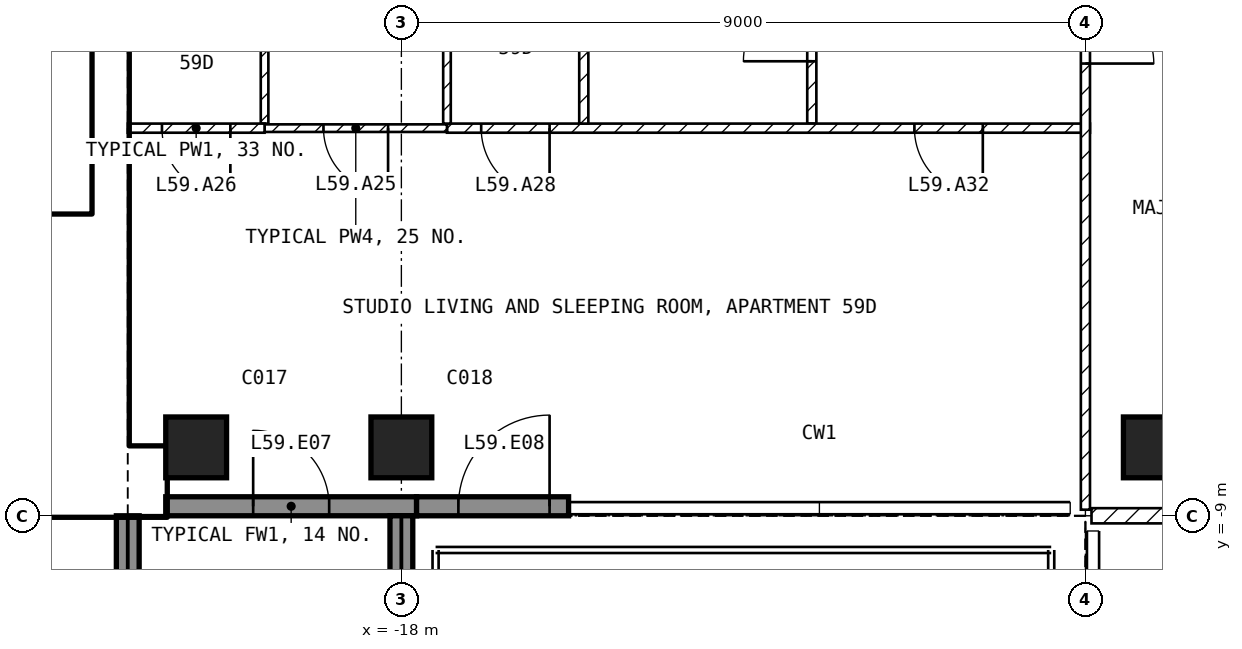
"""IFC4 building model, lengths in metres.
Left out: names, types, materials, properties, quantities, classifications, styles, units other than length and angle.
Written with IfcOpenShell. Run it as: python <this file> out.ifc"""

import sys

from ifc_helpers import new_model, si_unit, direction, frame, frame_2d, origin, origin_2d, place, context, subcontext, project, spatial, rectangle, extrude, element, fill, save


model = new_model("IFC4")
c1 = context("Model", 3, precision=1e-05, world=origin(), true_north=direction((0.0, 1.0)))
c2 = subcontext(c1, "Body", "Model", "MODEL_VIEW")
j1 = project(units=[si_unit("LENGTHUNIT", "METRE"), si_unit("PLANEANGLEUNIT", "RADIAN")], contexts=[c1])
p1 = place(None, origin())
s1 = spatial("IfcSite", under=j1, at=p1, CompositionType="ELEMENT")
p2 = place(p1, origin())
s2 = spatial("IfcBuilding", under=s1, at=p2, CompositionType="ELEMENT")
p3 = place(p2, frame((0.0, 0.0, 236.0)))
s3 = spatial("IfcBuildingStorey", under=s2, at=p3, CompositionType="ELEMENT", Elevation=236.0)
for number, where, z_axis, x_axis in (
    (1, (-20.7, -8.1, -0.25), (0.0, 0.0, 1.0), (1.0, 0.0, 0.0)),
    (2, (-18.0, -8.1, -0.25), (0.0, 0.0, 1.0), (1.0, 0.0, 0.0)),
    (3, (-8.1, -8.1, -0.25), (0.0, 0.0, 1.0), (1.0, 0.0, 0.0)),
):
    element("IfcColumn", number, at=place(p3, frame(where, z_axis=z_axis, x_axis=x_axis)), inside=s3, PredefinedType="COLUMN", context=c2, shape_type="SweptSolid", body=[
        extrude(rectangle(XDim=0.8, YDim=0.8, at=origin_2d()), origin(), (0.0, 0.0, 1.0), 3.5),
    ])
p4 = place(p3, frame((-21.1, -8.875, 0.0), z_axis=(0.0, 0.0, 1.0), x_axis=(1.0, 0.0, 0.0)))
e4 = element("IfcWall", 4, at=p4, inside=s3, PredefinedType="SOLIDWALL", context=c2, shape_type="SweptSolid", body=[
    extrude(rectangle(XDim=3.3, YDim=0.25, at=frame_2d((1.65, 0.0))), origin(), (0.0, 0.0, 1.0), 3.25),
])
p5 = place(p4, frame((1.15, 0.0, 0.0)))
e5 = element("IfcOpeningElement", 5, at=p5, cuts=e4, PredefinedType="OPENING", context=c2, shape_type="SweptSolid", body=[
    extrude(rectangle(XDim=1.0, YDim=2.4, at=frame_2d((0.5, 1.2))), frame((0.0, 0.135, 0.0), z_axis=(0.0, -1.0, 0.0), x_axis=(1.0, 0.0, 0.0)), (0.0, 0.0, 1.0), 0.27),
])
p6 = place(p3, frame((-17.8, -8.875, 0.0), z_axis=(0.0, 0.0, 1.0), x_axis=(1.0, 0.0, 0.0)))
e6 = element("IfcWall", 6, at=p6, inside=s3, PredefinedType="SOLIDWALL", context=c2, shape_type="SweptSolid", body=[
    extrude(rectangle(XDim=2.0, YDim=0.25, at=frame_2d((1.0, 0.0))), origin(), (0.0, 0.0, 1.0), 3.25),
])
p7 = place(p6, frame((0.55, 0.0, 0.0)))
e7 = element("IfcOpeningElement", 7, at=p7, cuts=e6, PredefinedType="OPENING", context=c2, shape_type="SweptSolid", body=[
    extrude(rectangle(XDim=1.2, YDim=2.4, at=frame_2d((0.6, 1.2))), frame((0.0, 0.135, 0.0), z_axis=(0.0, -1.0, 0.0), x_axis=(1.0, 0.0, 0.0)), (0.0, 0.0, 1.0), 0.27),
])
p8 = place(p3, frame((-21.6, -9.0, 0.0), z_axis=(0.0, 0.0, 1.0), x_axis=(0.0, -1.0, 0.0)))
e8 = element("IfcWall", 8, at=p8, inside=s3, PredefinedType="SOLIDWALL", context=c2, shape_type="SweptSolid", body=[
    extrude(rectangle(XDim=2.7, YDim=0.3, at=frame_2d((1.35, 0.0))), origin(), (0.0, 0.0, 1.0), 3.25),
])
p9 = place(p3, frame((-18.0, -9.0, 0.0), z_axis=(0.0, 0.0, 1.0), x_axis=(0.0, -1.0, 0.0)))
e9 = element("IfcWall", 9, at=p9, inside=s3, PredefinedType="SOLIDWALL", context=c2, shape_type="SweptSolid", body=[
    extrude(rectangle(XDim=2.74, YDim=0.3, at=frame_2d((1.37, 0.0))), origin(), (0.0, 0.0, 1.0), 3.25),
])
p10 = place(p3, frame((-30.2, -8.55, 0.0), z_axis=(0.0, 0.0, 1.0), x_axis=(1.0, 0.0, 0.0)))
e10 = element("IfcWall", 10, at=p10, inside=s3, PredefinedType="SHEAR", context=c2, shape_type="SweptSolid", body=[
    extrude(rectangle(XDim=9.1, YDim=0.9, at=frame_2d((4.55, 0.0))), origin(), (0.0, 0.0, 1.0), 3.25),
])
p11 = place(p3, frame((-21.825, -8.1, 0.0), z_axis=(0.0, 0.0, 1.0), x_axis=(0.0, 1.0, 0.0)))
e11 = element("IfcWall", 11, at=p11, inside=s3, PredefinedType="SHEAR", context=c2, shape_type="SweptSolid", body=[
    extrude(rectangle(XDim=6.9, YDim=0.45, at=frame_2d((3.45, 0.0))), origin(), (0.0, 0.0, 1.0), 3.25),
])
p12 = place(p3, frame((-28.35, -5.15, 0.0), z_axis=(0.0, 0.0, 1.0), x_axis=(1.0, 0.0, 0.0)))
e12 = element("IfcWall", 12, at=p12, inside=s3, PredefinedType="SOLIDWALL", context=c2, shape_type="SweptSolid", body=[
    extrude(rectangle(XDim=6.3, YDim=0.2, at=frame_2d((3.15, 0.0))), origin(), (0.0, 0.0, 1.0), 3.25),
])
p13 = place(p12, frame((5.1, 0.0, 0.0)))
e13 = element("IfcOpeningElement", 13, at=p13, cuts=e12, PredefinedType="OPENING", context=c2, shape_type="SweptSolid", body=[
    extrude(rectangle(XDim=1.0, YDim=2.1, at=frame_2d((0.5, 1.05))), frame((0.0, 0.11, 0.0), z_axis=(0.0, -1.0, 0.0), x_axis=(1.0, 0.0, 0.0)), (0.0, 0.0, 1.0), 0.22),
])
p14 = place(p3, frame((8.92, -9.0, 0.0), z_axis=(0.0, 0.0, 1.0), x_axis=(-1.0, 0.0, 0.0)))
e14 = element("IfcWall", 14, at=p14, inside=s3, PredefinedType="PARTITIONING", context=c2, shape_type="SweptSolid", body=[
    extrude(rectangle(XDim=17.84, YDim=0.2, at=frame_2d((8.92, 0.0))), origin(), (0.0, 0.0, 1.0), 3.25),
])
p15 = place(p14, frame((8.42, 0.0, 0.0)))
e15 = element("IfcOpeningElement", 15, at=p15, cuts=e14, PredefinedType="OPENING", context=c2, shape_type="SweptSolid", body=[
    extrude(rectangle(XDim=1.0, YDim=2.1, at=frame_2d((0.5, 1.05))), frame((0.0, 0.11, 0.0), z_axis=(0.0, -1.0, 0.0), x_axis=(1.0, 0.0, 0.0)), (0.0, 0.0, 1.0), 0.22),
])
p16 = place(p3, frame((-12.6, -3.84, 0.0), z_axis=(0.0, 0.0, 1.0), x_axis=(0.0, 1.0, 0.0)))
e16 = element("IfcWall", 16, at=p16, inside=s3, PredefinedType="PARTITIONING", context=c2, shape_type="SweptSolid", body=[
    extrude(rectangle(XDim=2.54, YDim=0.12, at=frame_2d((1.27, 0.0))), origin(), (0.0, 0.0, 1.0), 3.25),
])
p17 = place(p16, frame((0.82, 0.0, 0.0)))
e17 = element("IfcOpeningElement", 17, at=p17, cuts=e16, PredefinedType="OPENING", context=c2, shape_type="SweptSolid", body=[
    extrude(rectangle(XDim=0.9, YDim=2.1, at=frame_2d((0.45, 1.05))), frame((0.0, 0.07, 0.0), z_axis=(0.0, -1.0, 0.0), x_axis=(1.0, 0.0, 0.0)), (0.0, 0.0, 1.0), 0.14),
])
p18 = place(p3, frame((-8.94, -3.9, 0.0), z_axis=(0.0, 0.0, 1.0), x_axis=(-1.0, 0.0, 0.0)))
e18 = element("IfcWall", 18, at=p18, inside=s3, PredefinedType="PARTITIONING", context=c2, shape_type="SweptSolid", body=[
    extrude(rectangle(XDim=8.46, YDim=0.12, at=frame_2d((4.23, 0.0))), origin(), (0.0, 0.0, 1.0), 3.25),
])
p19 = place(p18, frame((7.11, 0.0, 0.0)))
e19 = element("IfcOpeningElement", 19, at=p19, cuts=e18, PredefinedType="OPENING", context=c2, shape_type="SweptSolid", body=[
    extrude(rectangle(XDim=0.9, YDim=2.1, at=frame_2d((0.45, 1.05))), frame((0.0, 0.07, 0.0), z_axis=(0.0, -1.0, 0.0), x_axis=(1.0, 0.0, 0.0)), (0.0, 0.0, 1.0), 0.14),
])
p20 = place(p18, frame((1.41, 0.0, 0.0)))
e20 = element("IfcOpeningElement", 20, at=p20, cuts=e18, PredefinedType="OPENING", context=c2, shape_type="SweptSolid", body=[
    extrude(rectangle(XDim=0.9, YDim=2.1, at=frame_2d((0.45, 1.05))), frame((0.0, 0.07, 0.0), z_axis=(0.0, -1.0, 0.0), x_axis=(1.0, 0.0, 0.0)), (0.0, 0.0, 1.0), 0.14),
])
p21 = place(p3, frame((-9.0, -1.3, 0.0), z_axis=(0.0, 0.0, 1.0), x_axis=(0.0, -1.0, 0.0)))
e21 = element("IfcWall", 21, at=p21, inside=s3, PredefinedType="PARTITIONING", context=c2, shape_type="SweptSolid", body=[
    extrude(rectangle(XDim=7.62, YDim=0.12, at=frame_2d((3.81, 0.0))), origin(), (0.0, 0.0, 1.0), 3.25),
])
p22 = place(p21, frame((0.85, 0.0, 0.0)))
e22 = element("IfcOpeningElement", 22, at=p22, cuts=e21, PredefinedType="OPENING", context=c2, shape_type="SweptSolid", body=[
    extrude(rectangle(XDim=0.9, YDim=2.1, at=frame_2d((0.45, 1.05))), frame((0.0, 0.07, 0.0), z_axis=(0.0, -1.0, 0.0), x_axis=(1.0, 0.0, 0.0)), (0.0, 0.0, 1.0), 0.14),
])
p23 = place(p3, frame((-15.6, -3.84, 0.0), z_axis=(0.0, 0.0, 1.0), x_axis=(0.0, 1.0, 0.0)))
e23 = element("IfcWall", 23, at=p23, inside=s3, PredefinedType="PARTITIONING", context=c2, shape_type="SweptSolid", body=[
    extrude(rectangle(XDim=2.54, YDim=0.12, at=frame_2d((1.27, 0.0))), origin(), (0.0, 0.0, 1.0), 3.25),
])
for number, where, z_axis, x_axis in (
    (24, (-17.4, -3.84, 0.0), (0.0, 0.0, 1.0), (0.0, 1.0, 0.0)),
    (25, (-19.8, -3.84, 0.0), (0.0, 0.0, 1.0), (0.0, 1.0, 0.0)),
):
    element("IfcWall", number, at=place(p3, frame(where, z_axis=z_axis, x_axis=x_axis)), inside=s3, PredefinedType="PARTITIONING", context=c2, shape_type="SweptSolid", body=[
        extrude(rectangle(XDim=2.54, YDim=0.1, at=frame_2d((1.27, 0.0))), origin(), (0.0, 0.0, 1.0), 3.25),
    ])
p24 = place(p3, frame((-17.4, -3.9, 0.0), z_axis=(0.0, 0.0, 1.0), x_axis=(-1.0, 0.0, 0.0)))
e26 = element("IfcWall", 26, at=p24, inside=s3, PredefinedType="PARTITIONING", context=c2, shape_type="SweptSolid", body=[
    extrude(rectangle(XDim=2.4, YDim=0.1, at=frame_2d((1.2, 0.0))), origin(), (0.0, 0.0, 1.0), 3.25),
])
p25 = place(p24, frame((0.775, 0.0, 0.0)))
e27 = element("IfcOpeningElement", 27, at=p25, cuts=e26, PredefinedType="OPENING", context=c2, shape_type="SweptSolid", body=[
    extrude(rectangle(XDim=0.85, YDim=2.1, at=frame_2d((0.425, 1.05))), frame((0.0, 0.06, 0.0), z_axis=(0.0, -1.0, 0.0), x_axis=(1.0, 0.0, 0.0)), (0.0, 0.0, 1.0), 0.12),
])
p26 = place(p3, frame((-19.8, -3.9, 0.0), z_axis=(0.0, 0.0, 1.0), x_axis=(-1.0, 0.0, 0.0)))
e28 = element("IfcWall", 28, at=p26, inside=s3, PredefinedType="PARTITIONING", context=c2, shape_type="SweptSolid", body=[
    extrude(rectangle(XDim=1.8, YDim=0.12, at=frame_2d((0.9, 0.0))), origin(), (0.0, 0.0, 1.0), 3.25),
])
p27 = place(p26, frame((0.45, 0.0, 0.0)))
e29 = element("IfcOpeningElement", 29, at=p27, cuts=e28, PredefinedType="OPENING", context=c2, shape_type="SweptSolid", body=[
    extrude(rectangle(XDim=0.9, YDim=2.1, at=frame_2d((0.45, 1.05))), frame((0.0, 0.07, 0.0), z_axis=(0.0, -1.0, 0.0), x_axis=(1.0, 0.0, 0.0)), (0.0, 0.0, 1.0), 0.14),
])
p28 = place(p5, origin())
e30 = element("IfcDoor", 30, at=p28, inside=s3, OperationType="SINGLE_SWING_LEFT", PredefinedType="DOOR", context=c2, shape_type="SweptSolid", body=[
    extrude(rectangle(XDim=1.0, YDim=2.4, at=frame_2d((0.5, 1.2))), frame((0.0, 0.025, 0.0), z_axis=(0.0, -1.0, 0.0), x_axis=(1.0, 0.0, 0.0)), (0.0, 0.0, 1.0), 0.05),
])
fill(e5, e30)
p29 = place(p7, origin())
e31 = element("IfcDoor", 31, at=p29, inside=s3, OperationType="SINGLE_SWING_RIGHT", PredefinedType="DOOR", context=c2, shape_type="SweptSolid", body=[
    extrude(rectangle(XDim=1.2, YDim=2.4, at=frame_2d((0.6, 1.2))), frame((0.0, 0.025, 0.0), z_axis=(0.0, -1.0, 0.0), x_axis=(1.0, 0.0, 0.0)), (0.0, 0.0, 1.0), 0.05),
])
fill(e7, e31)
p30 = place(p13, origin())
e32 = element("IfcDoor", 32, at=p30, inside=s3, OperationType="SINGLE_SWING_LEFT", PredefinedType="DOOR", context=c2, shape_type="SweptSolid", body=[
    extrude(rectangle(XDim=1.0, YDim=2.1, at=frame_2d((0.5, 1.05))), frame((0.0, 0.025, 0.0), z_axis=(0.0, -1.0, 0.0), x_axis=(1.0, 0.0, 0.0)), (0.0, 0.0, 1.0), 0.05),
])
fill(e13, e32)
p31 = place(p25, origin())
e33 = element("IfcDoor", 33, at=p31, inside=s3, OperationType="SINGLE_SWING_LEFT", PredefinedType="DOOR", context=c2, shape_type="SweptSolid", body=[
    extrude(rectangle(XDim=0.85, YDim=2.1, at=frame_2d((0.425, 1.05))), frame((0.0, 0.025, 0.0), z_axis=(0.0, -1.0, 0.0), x_axis=(1.0, 0.0, 0.0)), (0.0, 0.0, 1.0), 0.05),
])
fill(e27, e33)
p32 = place(p27, origin())
e34 = element("IfcDoor", 34, at=p32, inside=s3, OperationType="SINGLE_SWING_LEFT", PredefinedType="DOOR", context=c2, shape_type="SweptSolid", body=[
    extrude(rectangle(XDim=0.9, YDim=2.1, at=frame_2d((0.45, 1.05))), frame((0.0, 0.025, 0.0), z_axis=(0.0, -1.0, 0.0), x_axis=(1.0, 0.0, 0.0)), (0.0, 0.0, 1.0), 0.05),
])
fill(e29, e34)
p33 = place(p17, origin())
e35 = element("IfcDoor", 35, at=p33, inside=s3, OperationType="SINGLE_SWING_LEFT", PredefinedType="DOOR", context=c2, shape_type="SweptSolid", body=[
    extrude(rectangle(XDim=0.9, YDim=2.1, at=frame_2d((0.45, 1.05))), frame((0.0, 0.025, 0.0), z_axis=(0.0, -1.0, 0.0), x_axis=(1.0, 0.0, 0.0)), (0.0, 0.0, 1.0), 0.05),
])
fill(e17, e35)
p34 = place(p19, origin())
e36 = element("IfcDoor", 36, at=p34, inside=s3, OperationType="SINGLE_SWING_LEFT", PredefinedType="DOOR", context=c2, shape_type="SweptSolid", body=[
    extrude(rectangle(XDim=0.9, YDim=2.1, at=frame_2d((0.45, 1.05))), frame((0.0, 0.025, 0.0), z_axis=(0.0, -1.0, 0.0), x_axis=(1.0, 0.0, 0.0)), (0.0, 0.0, 1.0), 0.05),
])
fill(e19, e36)
p35 = place(p22, origin())
e37 = element("IfcDoor", 37, at=p35, inside=s3, OperationType="SINGLE_SWING_RIGHT", PredefinedType="DOOR", context=c2, shape_type="SweptSolid", body=[
    extrude(rectangle(XDim=0.9, YDim=2.1, at=frame_2d((0.45, 1.05))), frame((0.0, 0.025, 0.0), z_axis=(0.0, -1.0, 0.0), x_axis=(1.0, 0.0, 0.0)), (0.0, 0.0, 1.0), 0.05),
])
fill(e22, e37)
p36 = place(p20, origin())
e38 = element("IfcDoor", 38, at=p36, inside=s3, OperationType="SINGLE_SWING_LEFT", PredefinedType="DOOR", context=c2, shape_type="SweptSolid", body=[
    extrude(rectangle(XDim=0.9, YDim=2.1, at=frame_2d((0.45, 1.05))), frame((0.0, 0.025, 0.0), z_axis=(0.0, -1.0, 0.0), x_axis=(1.0, 0.0, 0.0)), (0.0, 0.0, 1.0), 0.05),
])
fill(e20, e38)
save(model, sys.argv[1])
